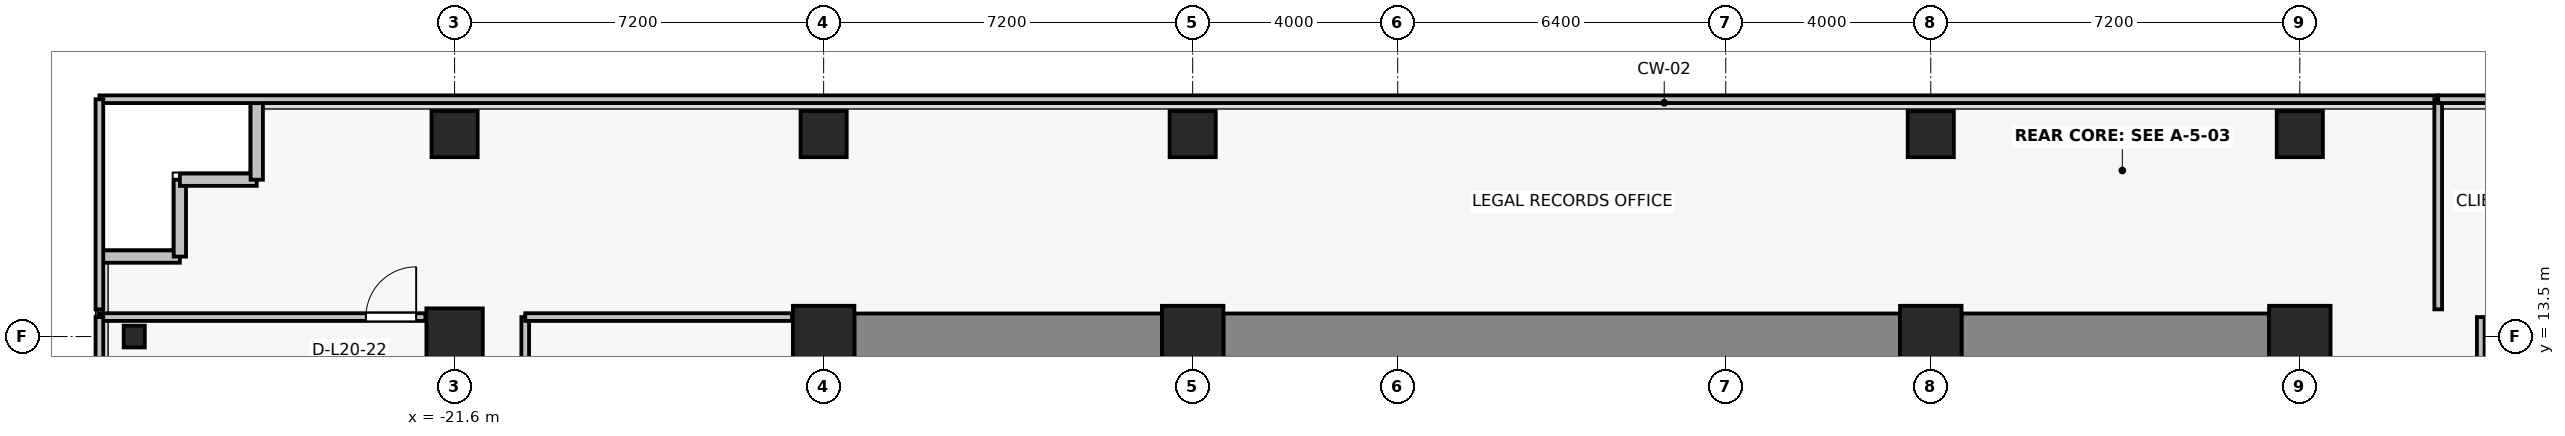
"""IFC4 building model, lengths in metres.
Left out: names, types, materials, properties, quantities, classifications, styles, units other than length and angle.
Written with IfcOpenShell. Run it as: python <this file> out.ifc"""

import sys

from ifc_helpers import new_model, si_unit, direction, frame, frame_2d, origin, origin_2d, place, context, subcontext, project, spatial, rectangle, i_section, extrude, source, transform, mapped, element, fill, save


model = new_model("IFC4")
c1 = context("Model", 3, precision=1e-05, world=origin(), true_north=direction((0.0, 1.0)))
c2 = subcontext(c1, "Body", "Model", "MODEL_VIEW")
j1 = project(units=[si_unit("LENGTHUNIT", "METRE"), si_unit("PLANEANGLEUNIT", "RADIAN")], contexts=[c1])
p1 = place(None, origin())
s1 = spatial("IfcSite", under=j1, at=p1, CompositionType="ELEMENT")
p2 = place(p1, origin())
s2 = spatial("IfcBuilding", under=s1, at=p2, CompositionType="ELEMENT")
p3 = place(p2, frame((0.0, 0.0, 73.6)))
s3 = spatial("IfcBuildingStorey", under=s2, at=p3, CompositionType="ELEMENT", Elevation=73.6)
for number, where, z_axis, x_axis in (
    (1, (-14.4, 13.5, 0.0), (0.0, 0.0, 1.0), (1.0, 0.0, 0.0)),
    (2, (-7.2, 13.5, 0.0), (0.0, 0.0, 1.0), (1.0, 0.0, 0.0)),
    (3, (7.2, 13.5, 0.0), (0.0, 0.0, 1.0), (1.0, 0.0, 0.0)),
    (4, (14.4, 13.5, 0.0), (0.0, 0.0, 1.0), (1.0, 0.0, 0.0)),
):
    element("IfcColumn", number, at=place(p3, frame(where, z_axis=z_axis, x_axis=x_axis)), inside=s3, PredefinedType="COLUMN", context=c2, shape_type="SweptSolid", body=[
        extrude(rectangle(XDim=1.2, YDim=1.2, at=origin_2d()), origin(), (0.0, 0.0, 1.0), 3.3),
    ])
p4 = place(p3, frame((-21.6, 13.5, 0.0), z_axis=(0.0, 0.0, 1.0), x_axis=(1.0, 0.0, 0.0)))
e5 = element("IfcColumn", 5, at=p4, inside=s3, PredefinedType="COLUMN", context=c2, shape_type="SweptSolid", body=[
    extrude(rectangle(XDim=1.1, YDim=1.1, at=origin_2d()), origin(), (0.0, 0.0, 1.0), 3.3),
])
for number, where, z_axis, x_axis in (
    (6, (-14.4, 17.45, 0.0), (0.0, 0.0, 1.0), (1.0, 0.0, 0.0)),
    (7, (-7.2, 17.45, 0.0), (0.0, 0.0, 1.0), (1.0, 0.0, 0.0)),
    (8, (7.2, 17.45, 0.0), (0.0, 0.0, 1.0), (1.0, 0.0, 0.0)),
    (9, (14.4, 17.45, 0.0), (0.0, 0.0, 1.0), (1.0, 0.0, 0.0)),
    (10, (-21.6, 17.45, 0.0), (0.0, 0.0, 1.0), (1.0, 0.0, 0.0)),
):
    element("IfcColumn", number, at=place(p3, frame(where, z_axis=z_axis, x_axis=x_axis)), inside=s3, PredefinedType="COLUMN", context=c2, shape_type="SweptSolid", body=[
        extrude(rectangle(XDim=0.9, YDim=0.9, at=origin_2d()), origin(), (0.0, 0.0, 1.0), 3.3),
    ])
p5 = place(p3, frame((-27.85, 13.5, 0.0), z_axis=(0.0, 0.0, 1.0), x_axis=(1.0, 0.0, 0.0)))
e11 = element("IfcColumn", 11, at=p5, inside=s3, PredefinedType="COLUMN", context=c2, shape_type="SweptSolid", body=[
    extrude(i_section(OverallWidth=0.412, OverallDepth=0.425, WebThickness=0.026, FlangeThickness=0.039, FilletRadius=0.015, at=origin_2d()), origin(), (0.0, 0.0, 1.0), 3.3),
])
p6 = place(p3, frame((-13.8, 13.5, 0.0), z_axis=(0.0, 0.0, 1.0), x_axis=(1.0, 0.0, 0.0)))
e12 = element("IfcWall", 12, at=p6, inside=s3, PredefinedType="SHEAR", context=c2, shape_type="SweptSolid", body=[
    extrude(rectangle(XDim=6.0, YDim=0.9, at=frame_2d((3.0, 0.0))), origin(), (0.0, 0.0, 1.0), 3.075),
])
p7 = place(p3, frame((-6.6, 13.5, 0.0), z_axis=(0.0, 0.0, 1.0), x_axis=(1.0, 0.0, 0.0)))
e13 = element("IfcWall", 13, at=p7, inside=s3, PredefinedType="SHEAR", context=c2, shape_type="SweptSolid", body=[
    extrude(rectangle(XDim=13.2, YDim=0.9, at=frame_2d((6.6, 0.0))), origin(), (0.0, 0.0, 1.0), 3.075),
])
p8 = place(p3, frame((7.8, 13.5, 0.0), z_axis=(0.0, 0.0, 1.0), x_axis=(1.0, 0.0, 0.0)))
e14 = element("IfcWall", 14, at=p8, inside=s3, PredefinedType="SHEAR", context=c2, shape_type="SweptSolid", body=[
    extrude(rectangle(XDim=6.0, YDim=0.9, at=frame_2d((3.0, 0.0))), origin(), (0.0, 0.0, 1.0), 3.075),
])
for number, where, z_axis, x_axis in (
    (15, (-26.96, 15.06, 0.0), (0.0, 0.0, 1.0), (-1.0, 0.0, 0.0)),
    (16, (-26.96, 16.56, 0.0), (0.0, 0.0, 1.0), (0.0, -1.0, 0.0)),
    (17, (-25.46, 16.56, 0.0), (0.0, 0.0, 1.0), (-1.0, 0.0, 0.0)),
    (18, (-25.46, 18.06, 0.0), (0.0, 0.0, 1.0), (0.0, -1.0, 0.0)),
):
    element("IfcWall", number, at=place(p3, frame(where, z_axis=z_axis, x_axis=x_axis)), inside=s3, PredefinedType="SOLIDWALL", context=c2, shape_type="SweptSolid", body=[
        extrude(rectangle(XDim=1.5, YDim=0.24, at=frame_2d((0.75, 0.0))), origin(), (0.0, 0.0, 1.0), 3.075),
    ])
p9 = place(p3, frame((-28.53, 13.88, 0.0), z_axis=(0.0, 0.0, 1.0), x_axis=(1.0, 0.0, 0.0)))
e19 = element("IfcWall", 19, at=p9, inside=s3, PredefinedType="PARTITIONING", context=c2, shape_type="SweptSolid", body=[
    extrude(rectangle(XDim=6.36, YDim=0.15, at=frame_2d((3.18, 0.0))), origin(), (0.0, 0.0, 1.0), 3.075),
])
p10 = place(p9, frame((5.2, 0.0, 0.0)))
e20 = element("IfcOpeningElement", 20, at=p10, cuts=e19, PredefinedType="OPENING", context=c2, shape_type="SweptSolid", body=[
    extrude(rectangle(XDim=0.98, YDim=2.15, at=frame_2d((0.49, 1.075))), frame((0.0, 0.085, 0.0), z_axis=(0.0, -1.0, 0.0), x_axis=(1.0, 0.0, 0.0)), (0.0, 0.0, 1.0), 0.17),
])
p11 = place(p3, frame((-28.53, -1.77, 0.0), z_axis=(0.0, 0.0, 1.0), x_axis=(0.0, 1.0, 0.0)))
e21 = element("IfcWall", 21, at=p11, inside=s3, PredefinedType="PARTITIONING", context=c2, shape_type="SweptSolid", body=[
    extrude(rectangle(XDim=15.65, YDim=0.15, at=frame_2d((7.825, 0.0))), origin(), (0.0, 0.0, 1.0), 3.075),
])
p12 = place(p3, frame((-20.222, 13.88, 0.0), z_axis=(0.0, 0.0, 1.0), x_axis=(0.0, -1.0, 0.0)))
e22 = element("IfcWall", 22, at=p12, inside=s3, PredefinedType="PARTITIONING", context=c2, shape_type="SweptSolid", body=[
    extrude(rectangle(XDim=15.65, YDim=0.15, at=frame_2d((7.825, 0.0))), origin(), (0.0, 0.0, 1.0), 2.465),
])
p13 = place(p3, frame((-20.222, 13.88, 0.0), z_axis=(0.0, 0.0, 1.0), x_axis=(1.0, 0.0, 0.0)))
e23 = element("IfcWall", 23, at=p13, inside=s3, PredefinedType="PARTITIONING", context=c2, shape_type="SweptSolid", body=[
    extrude(rectangle(XDim=5.202, YDim=0.15, at=frame_2d((2.601, 0.0))), origin(), (0.0, 0.0, 1.0), 3.075),
])
p14 = place(p3, frame((17.93, 9.693, 0.0), z_axis=(0.0, 0.0, 1.0), x_axis=(0.0, 1.0, 0.0)))
e24 = element("IfcWall", 24, at=p14, inside=s3, PredefinedType="PARTITIONING", context=c2, shape_type="SweptSolid", body=[
    extrude(rectangle(XDim=4.187, YDim=0.15, at=frame_2d((2.093, 0.0))), origin(), (0.0, 0.0, 1.0), 2.465),
])
p15 = place(p14, frame((1.604, 0.0, 0.0)))
e25 = element("IfcOpeningElement", 25, at=p15, cuts=e24, PredefinedType="OPENING", context=c2, shape_type="SweptSolid", body=[
    extrude(rectangle(XDim=0.98, YDim=2.15, at=frame_2d((0.49, 1.075))), frame((0.0, 0.085, 0.0), z_axis=(0.0, -1.0, 0.0), x_axis=(1.0, 0.0, 0.0)), (0.0, 0.0, 1.0), 0.17),
])
p16 = place(p3, frame((-28.53, 18.13, 0.0), z_axis=(0.0, 0.0, 1.0), x_axis=(1.0, 0.0, 0.0)))
e26 = element("IfcWall", 26, at=p16, inside=s3, PredefinedType="PARTITIONING", context=c2, shape_type="SweptSolid", body=[
    extrude(rectangle(XDim=45.63, YDim=0.15, at=frame_2d((22.815, 0.0))), origin(), (0.0, 0.0, 1.0), 3.075),
])
p17 = place(p3, frame((-28.53, 14.03, 0.0), z_axis=(0.0, 0.0, 1.0), x_axis=(0.0, 1.0, 0.0)))
e27 = element("IfcWall", 27, at=p17, inside=s3, PredefinedType="PARTITIONING", context=c2, shape_type="SweptSolid", body=[
    extrude(rectangle(XDim=4.1, YDim=0.15, at=frame_2d((2.05, 0.0))), origin(), (0.0, 0.0, 1.0), 3.075),
])
p18 = place(p3, frame((17.1, 18.13, 0.0), z_axis=(0.0, 0.0, 1.0), x_axis=(0.0, -1.0, 0.0)))
e28 = element("IfcWall", 28, at=p18, inside=s3, PredefinedType="PARTITIONING", context=c2, shape_type="SweptSolid", body=[
    extrude(rectangle(XDim=4.1, YDim=0.15, at=frame_2d((2.05, 0.0))), origin(), (0.0, 0.0, 1.0), 2.465),
])
p19 = place(p3, frame((17.1, 18.13, 0.0), z_axis=(0.0, 0.0, 1.0), x_axis=(1.0, 0.0, 0.0)))
e29 = element("IfcWall", 29, at=p19, inside=s3, PredefinedType="PARTITIONING", context=c2, shape_type="SweptSolid", body=[
    extrude(rectangle(XDim=15.43, YDim=0.15, at=frame_2d((7.715, 0.0))), origin(), (0.0, 0.0, 1.0), 3.075),
])
m1 = source(origin(), c2, "Body", "SweptSolid", [
    extrude(rectangle(XDim=0.98, YDim=2.15, at=frame_2d((0.49, 1.075))), frame((0.0, 0.025, 0.0), z_axis=(0.0, -1.0, 0.0), x_axis=(1.0, 0.0, 0.0)), (0.0, 0.0, 1.0), 0.05),
])
p20 = place(p10, origin())
e30 = element("IfcDoor", 30, at=p20, inside=s3, OperationType="SINGLE_SWING_RIGHT", PredefinedType="DOOR", context=c2, shape_type="MappedRepresentation", body=[
    mapped(m1, transform((0.0, 0.0, 0.0), x_axis=(1.0, 0.0, 0.0), y_axis=(0.0, 1.0, 0.0), z_axis=(0.0, 0.0, 1.0), scale=1.0)),
])
fill(e20, e30)
save(model, sys.argv[1])
